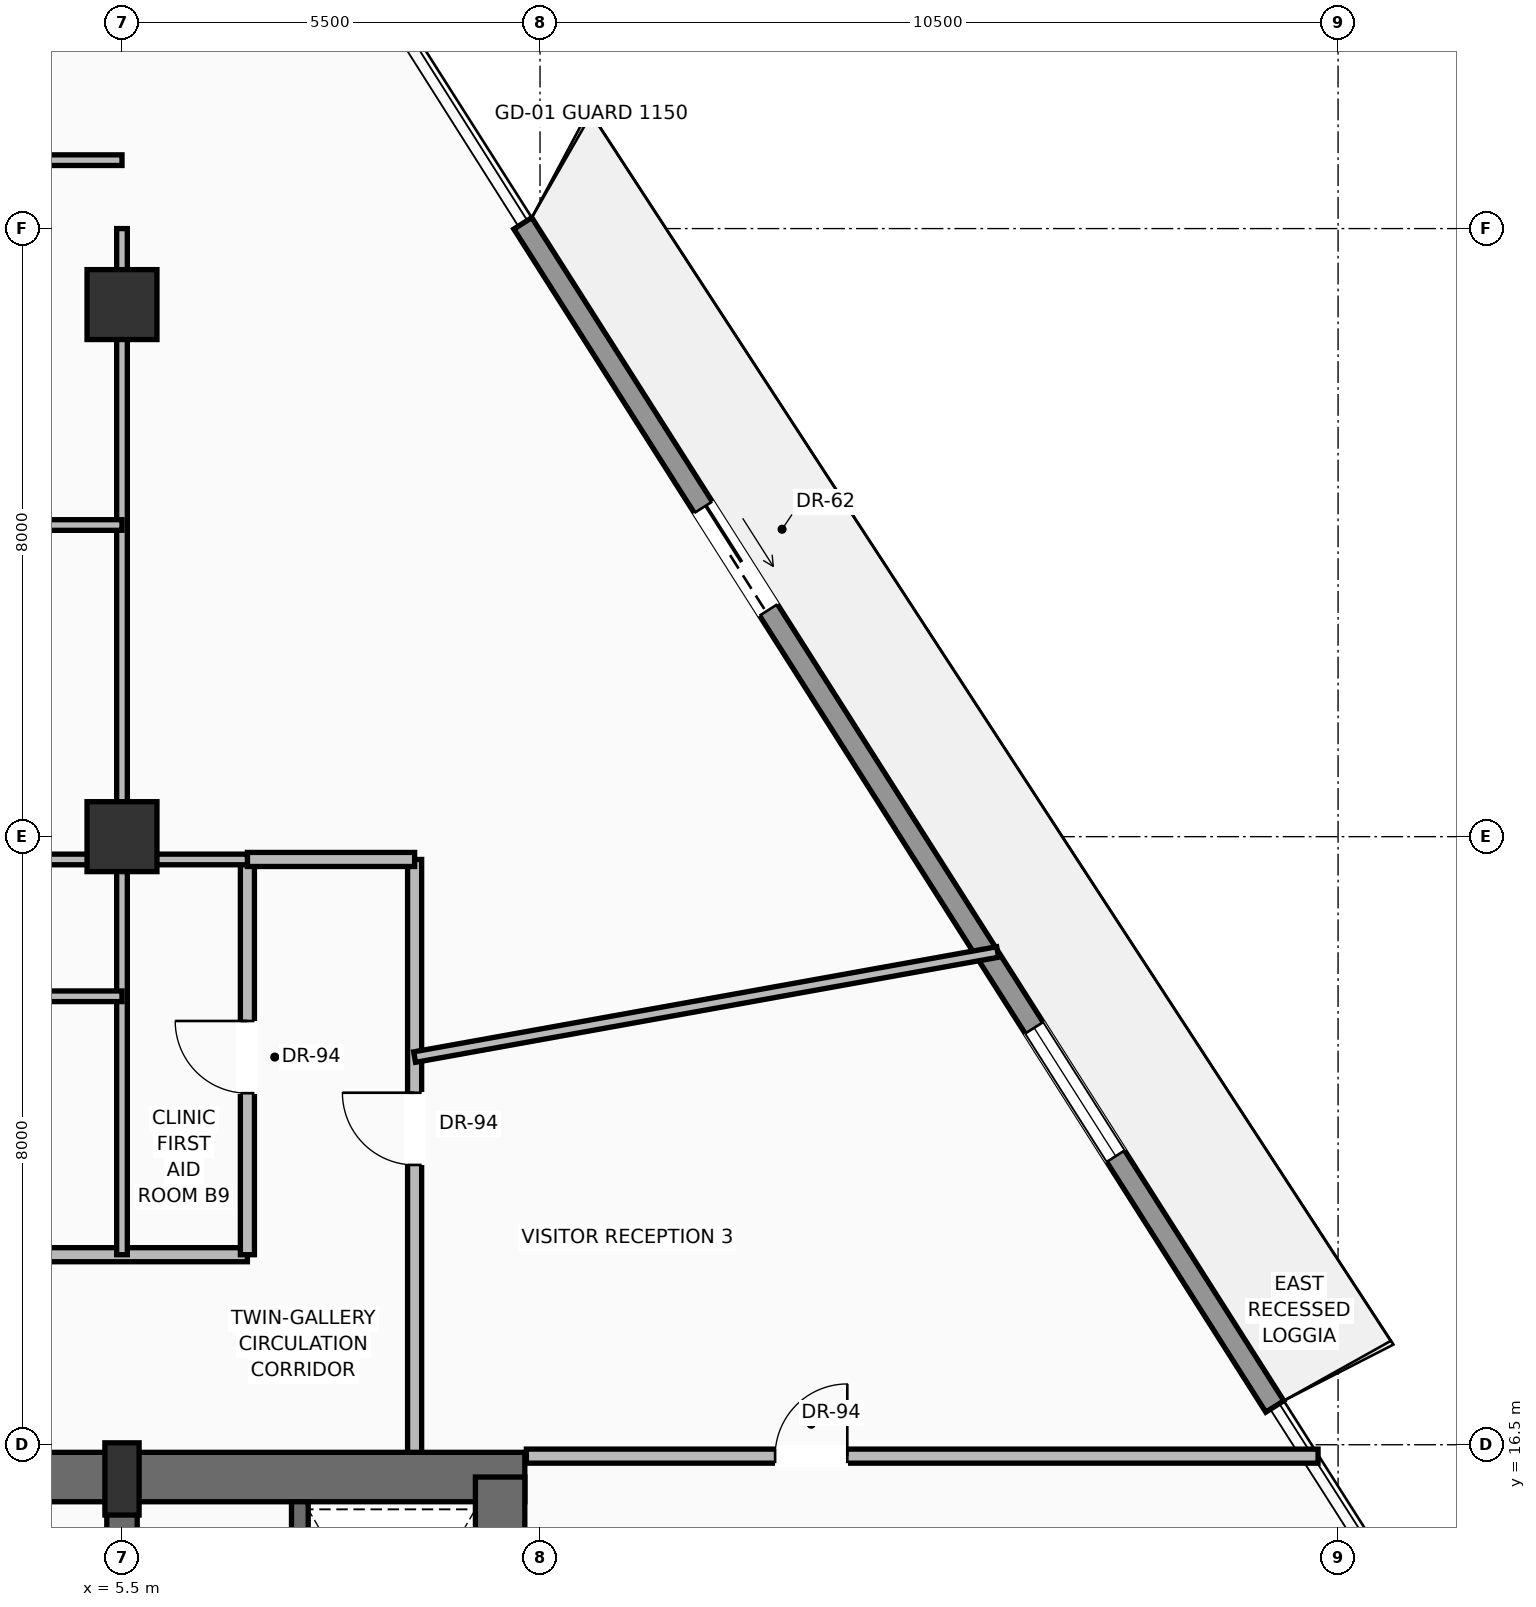
"""IFC4 building model, lengths in metres.
Left out: names, types, materials, properties, quantities, classifications, styles, units other than length and angle.
Written with IfcOpenShell. Run it as: python <this file> out.ifc"""

import sys

from ifc_helpers import new_model, si_unit, direction, frame, frame_2d, origin, origin_2d, place, context, subcontext, project, spatial, rectangle, extrude, source, transform, mapped, element, fill, save


model = new_model("IFC4")
c1 = context("Model", 3, precision=1e-05, world=origin(), true_north=direction((0.0, 1.0)))
c2 = subcontext(c1, "Body", "Model", "MODEL_VIEW")
j1 = project(units=[si_unit("LENGTHUNIT", "METRE"), si_unit("PLANEANGLEUNIT", "RADIAN")], contexts=[c1])
p1 = place(None, origin())
s1 = spatial("IfcSite", under=j1, at=p1, CompositionType="ELEMENT")
p2 = place(p1, origin())
s2 = spatial("IfcBuilding", under=s1, at=p2, CompositionType="ELEMENT")
p3 = place(p2, frame((0.0, 0.0, 158.9)))
s3 = spatial("IfcBuildingStorey", under=s2, at=p3, CompositionType="ELEMENT", Elevation=158.9)
p4 = place(p3, frame((-10.8, 16.075, 0.0), z_axis=(0.0, 0.0, 1.0), x_axis=(1.0, 0.0, 0.0)))
e1 = element("IfcWall", 1, at=p4, inside=s3, PredefinedType="SHEAR", context=c2, shape_type="SweptSolid", body=[
    extrude(rectangle(XDim=21.6, YDim=0.65, at=frame_2d((10.8, 0.0))), origin(), (0.0, 0.0, 1.0), 3.47),
])
p5 = place(p4, frame((3.37, 0.0, 0.0)))
e2 = element("IfcOpeningElement", 2, at=p5, cuts=e1, PredefinedType="OPENING", context=c2, shape_type="SweptSolid", body=[
    extrude(rectangle(XDim=1.3, YDim=2.3, at=frame_2d((0.65, 1.15))), frame((0.0, 0.335, 0.0), z_axis=(0.0, -1.0, 0.0), x_axis=(1.0, 0.0, 0.0)), (0.0, 0.0, 1.0), 0.67),
])
p6 = place(p4, frame((9.8, 0.0, 0.0)))
e3 = element("IfcOpeningElement", 3, at=p6, cuts=e1, PredefinedType="OPENING", context=c2, shape_type="SweptSolid", body=[
    extrude(rectangle(XDim=2.0, YDim=2.4, at=frame_2d((1.0, 1.2))), frame((0.0, 0.335, 0.0), z_axis=(0.0, -1.0, 0.0), x_axis=(1.0, 0.0, 0.0)), (0.0, 0.0, 1.0), 0.67),
])
p7 = place(p3, frame((10.475, 0.525, 0.0), z_axis=(0.0, 0.0, 1.0), x_axis=(0.0, 1.0, 0.0)))
e4 = element("IfcWall", 4, at=p7, inside=s3, PredefinedType="SHEAR", context=c2, shape_type="SweptSolid", body=[
    extrude(rectangle(XDim=15.55, YDim=0.65, at=frame_2d((7.775, 0.0))), origin(), (0.0, 0.0, 1.0), 3.47),
])
p8 = place(p3, frame((5.5, 0.525, 0.0), z_axis=(0.0, 0.0, 1.0), x_axis=(0.0, 1.0, 0.0)))
e5 = element("IfcWall", 5, at=p8, inside=s3, PredefinedType="SHEAR", context=c2, shape_type="SweptSolid", body=[
    extrude(rectangle(XDim=15.55, YDim=0.4, at=frame_2d((7.775, 0.0))), origin(), (0.0, 0.0, 1.0), 3.47),
])
p9 = place(p8, frame((8.975, 0.0, 0.0)))
e6 = element("IfcOpeningElement", 6, at=p9, cuts=e5, PredefinedType="OPENING", context=c2, shape_type="SweptSolid", body=[
    extrude(rectangle(XDim=1.1, YDim=2.2, at=frame_2d((0.55, 1.1))), frame((0.0, 0.21, 0.0), z_axis=(0.0, -1.0, 0.0), x_axis=(1.0, 0.0, 0.0)), (0.0, 0.0, 1.0), 0.42),
])
m1 = source(origin(), c2, "Body", "SweptSolid", [
    extrude(rectangle(XDim=0.45, YDim=0.95, at=origin_2d()), origin(), (0.0, 0.0, 1.0), 3.7),
])
p10 = place(p3, frame((5.5, 16.05, 0.0), z_axis=(0.0, 0.0, 1.0), x_axis=(1.0, 0.0, 0.0)))
e7 = element("IfcColumn", 7, at=p10, inside=s3, PredefinedType="PILASTER", context=c2, shape_type="MappedRepresentation", body=[
    mapped(m1, transform((0.0, 0.0, 0.0), scale=1.0)),
])
m2 = source(origin(), c2, "Body", "SweptSolid", [
    extrude(rectangle(XDim=0.92, YDim=0.92, at=origin_2d()), origin(), (0.0, 0.0, 1.0), 3.7),
])
for number, where, z_axis, x_axis in (
    (8, (5.5, 24.5, 0.0), (0.0, 0.0, 1.0), (1.0, 0.0, 0.0)),
    (9, (5.5, 31.5, 0.0), (0.0, 0.0, 1.0), (1.0, 0.0, 0.0)),
):
    element("IfcColumn", number, at=place(p3, frame(where, z_axis=z_axis, x_axis=x_axis)), inside=s3, PredefinedType="COLUMN", context=c2, shape_type="MappedRepresentation", body=[
        mapped(m2, transform((0.0, 0.0, 0.0), scale=1.0)),
    ])
p11 = place(p3, frame((10.773, 32.569, 0.0), z_axis=(0.0, 0.0, 1.0), x_axis=(0.536444584594, -0.8439355471, 0.0)))
e10 = element("IfcWall", 10, at=p11, inside=s3, PredefinedType="SOLIDWALL", context=c2, shape_type="SweptSolid", body=[
    extrude(rectangle(XDim=18.443, YDim=0.28, at=frame_2d((9.222, 0.0))), origin(), (0.0, 0.0, 1.0), 3.05),
])
p12 = place(p11, frame((4.427, 0.0, 0.0)))
e11 = element("IfcOpeningElement", 11, at=p12, cuts=e10, PredefinedType="OPENING", context=c2, shape_type="SweptSolid", body=[
    extrude(rectangle(XDim=1.6, YDim=2.35, at=frame_2d((0.8, 1.175))), frame((0.0, 0.15, 0.0), z_axis=(0.0, -1.0, 0.0), x_axis=(1.0, 0.0, 0.0)), (0.0, 0.0, 1.0), 0.3),
])
p13 = place(p11, frame((12.542, 0.0, 0.9)))
e12 = element("IfcOpeningElement", 12, at=p13, cuts=e10, PredefinedType="OPENING", context=c2, shape_type="SweptSolid", body=[
    extrude(rectangle(XDim=2.0, YDim=1.85, at=frame_2d((1.0, 0.925))), frame((0.0, 0.15, 0.0), z_axis=(0.0, -1.0, 0.0), x_axis=(1.0, 0.0, 0.0)), (0.0, 0.0, 1.0), 0.3),
])
p14 = place(p3, frame((7.84, 11.87, 0.0), z_axis=(0.0, 0.0, 1.0), x_axis=(0.0, 1.0, 0.0)))
e13 = element("IfcWall", 13, at=p14, inside=s3, PredefinedType="SOLIDWALL", context=c2, shape_type="SweptSolid", body=[
    extrude(rectangle(XDim=3.88, YDim=0.22, at=frame_2d((1.94, 0.0))), origin(), (0.0, 0.0, 1.0), 3.47),
])
p15 = place(p3, frame((-7.15, 19.0, 0.0), z_axis=(0.0, 0.0, 1.0), x_axis=(1.0, 0.0, 0.0)))
e14 = element("IfcWall", 14, at=p15, inside=s3, PredefinedType="PARTITIONING", context=c2, shape_type="SweptSolid", body=[
    extrude(rectangle(XDim=14.3, YDim=0.185, at=frame_2d((7.15, 0.0))), origin(), (0.0, 0.0, 1.0), 2.846),
])
p16 = place(p15, frame((6.675, 0.0, 0.0)))
e15 = element("IfcOpeningElement", 15, at=p16, cuts=e14, PredefinedType="OPENING", context=c2, shape_type="SweptSolid", body=[
    extrude(rectangle(XDim=0.95, YDim=2.2, at=frame_2d((0.475, 1.1))), frame((0.0, 0.103, 0.0), z_axis=(0.0, -1.0, 0.0), x_axis=(1.0, 0.0, 0.0)), (0.0, 0.0, 1.0), 0.205),
])
p17 = place(p3, frame((7.15, 19.0, 0.0), z_axis=(0.0, 0.0, 1.0), x_axis=(0.0, 1.0, 0.0)))
e16 = element("IfcWall", 16, at=p17, inside=s3, PredefinedType="PARTITIONING", context=c2, shape_type="SweptSolid", body=[
    extrude(rectangle(XDim=5.2, YDim=0.185, at=frame_2d((2.6, 0.0))), origin(), (0.0, 0.0, 1.0), 3.462),
])
p18 = place(p17, frame((2.125, 0.0, 0.0)))
e17 = element("IfcOpeningElement", 17, at=p18, cuts=e16, PredefinedType="OPENING", context=c2, shape_type="SweptSolid", body=[
    extrude(rectangle(XDim=0.95, YDim=2.2, at=frame_2d((0.475, 1.1))), frame((0.0, 0.103, 0.0), z_axis=(0.0, -1.0, 0.0), x_axis=(1.0, 0.0, 0.0)), (0.0, 0.0, 1.0), 0.205),
])
p19 = place(p3, frame((9.35, 16.4, 0.0), z_axis=(0.0, 0.0, 1.0), x_axis=(0.0, 1.0, 0.0)))
e18 = element("IfcWall", 18, at=p19, inside=s3, PredefinedType="PARTITIONING", context=c2, shape_type="SweptSolid", body=[
    extrude(rectangle(XDim=7.8, YDim=0.185, at=frame_2d((3.9, 0.0))), origin(), (0.0, 0.0, 1.0), 3.462),
])
p20 = place(p19, frame((3.781, 0.0, 0.0)))
e19 = element("IfcOpeningElement", 19, at=p20, cuts=e18, PredefinedType="OPENING", context=c2, shape_type="SweptSolid", body=[
    extrude(rectangle(XDim=0.95, YDim=2.2, at=frame_2d((0.475, 1.1))), frame((0.0, 0.103, 0.0), z_axis=(0.0, -1.0, 0.0), x_axis=(1.0, 0.0, 0.0)), (0.0, 0.0, 1.0), 0.205),
])
p21 = place(p3, frame((7.15, 24.2, 0.0), z_axis=(0.0, 0.0, 1.0), x_axis=(1.0, 0.0, 0.0)))
e20 = element("IfcWall", 20, at=p21, inside=s3, PredefinedType="PARTITIONING", context=c2, shape_type="SweptSolid", body=[
    extrude(rectangle(XDim=2.2, YDim=0.185, at=frame_2d((1.1, 0.0))), origin(), (0.0, 0.0, 1.0), 3.462),
])
p22 = place(p3, frame((10.82, 16.35, 0.0), z_axis=(0.0, 0.0, 1.0), x_axis=(1.0, 0.0, 0.0)))
e21 = element("IfcWall", 21, at=p22, inside=s3, PredefinedType="PARTITIONING", context=c2, shape_type="SweptSolid", body=[
    extrude(rectangle(XDim=10.417, YDim=0.185, at=frame_2d((5.208, 0.0))), origin(), (0.0, 0.0, 1.0), 3.462),
])
p23 = place(p22, frame((3.273, 0.0, 0.0)))
e22 = element("IfcOpeningElement", 22, at=p23, cuts=e21, PredefinedType="OPENING", context=c2, shape_type="SweptSolid", body=[
    extrude(rectangle(XDim=0.95, YDim=2.2, at=frame_2d((0.475, 1.1))), frame((0.0, 0.103, 0.0), z_axis=(0.0, -1.0, 0.0), x_axis=(1.0, 0.0, 0.0)), (0.0, 0.0, 1.0), 0.205),
])
p24 = place(p3, frame((-7.15, 24.2, 0.0), z_axis=(0.0, 0.0, 1.0), x_axis=(1.0, 0.0, 0.0)))
e23 = element("IfcWall", 23, at=p24, inside=s3, PredefinedType="PARTITIONING", context=c2, shape_type="SweptSolid", body=[
    extrude(rectangle(XDim=14.3, YDim=0.14, at=frame_2d((7.15, 0.0))), origin(), (0.0, 0.0, 1.0), 3.462),
])
p25 = place(p3, frame((5.5, 19.0, 0.0), z_axis=(0.0, 0.0, 1.0), x_axis=(0.0, 1.0, 0.0)))
e24 = element("IfcWall", 24, at=p25, inside=s3, PredefinedType="PARTITIONING", context=c2, shape_type="SweptSolid", body=[
    extrude(rectangle(XDim=13.5, YDim=0.14, at=frame_2d((6.75, 0.0))), origin(), (0.0, 0.0, 1.0), 2.846),
])
p26 = place(p3, frame((-5.5, 22.4, 0.0), z_axis=(0.0, 0.0, 1.0), x_axis=(1.0, 0.0, 0.0)))
e25 = element("IfcWall", 25, at=p26, inside=s3, PredefinedType="PARTITIONING", context=c2, shape_type="SweptSolid", body=[
    extrude(rectangle(XDim=11.0, YDim=0.14, at=frame_2d((5.5, 0.0))), origin(), (0.0, 0.0, 1.0), 3.462),
])
p27 = place(p26, frame((5.025, 0.0, 0.0)))
e26 = element("IfcOpeningElement", 26, at=p27, cuts=e25, PredefinedType="OPENING", context=c2, shape_type="SweptSolid", body=[
    extrude(rectangle(XDim=0.95, YDim=2.2, at=frame_2d((0.475, 1.1))), frame((0.0, 0.08, 0.0), z_axis=(0.0, -1.0, 0.0), x_axis=(1.0, 0.0, 0.0)), (0.0, 0.0, 1.0), 0.16),
])
for number, where, z_axis, x_axis in (
    (27, (-5.5, 28.6, 0.0), (0.0, 0.0, 1.0), (1.0, 0.0, 0.0)),
    (28, (-5.5, 33.4, 0.0), (0.0, 0.0, 1.0), (1.0, 0.0, 0.0)),
):
    element("IfcWall", number, at=place(p3, frame(where, z_axis=z_axis, x_axis=x_axis)), inside=s3, PredefinedType="PARTITIONING", context=c2, shape_type="SweptSolid", body=[
        extrude(rectangle(XDim=11.0, YDim=0.14, at=frame_2d((5.5, 0.0))), origin(), (0.0, 0.0, 1.0), 3.462),
    ])
p28 = place(p3, frame((9.35, 21.6, 0.0), z_axis=(0.0, 0.0, 1.0), x_axis=(0.984141901037, 0.177382971628, 0.0)))
e29 = element("IfcWall", 29, at=p28, inside=s3, PredefinedType="PARTITIONING", context=c2, shape_type="SweptSolid", body=[
    extrude(rectangle(XDim=7.794, YDim=0.14, at=frame_2d((3.897, 0.0))), origin(), (0.0, 0.0, 1.0), 3.049),
])
m3 = source(origin(), c2, "Body", "SweptSolid", [
    extrude(rectangle(XDim=1.6, YDim=2.35, at=frame_2d((0.8, 1.175))), frame((0.0, 0.025, 0.0), z_axis=(0.0, -1.0, 0.0), x_axis=(1.0, 0.0, 0.0)), (0.0, 0.0, 1.0), 0.05),
])
p29 = place(p12, origin())
e30 = element("IfcDoor", 30, at=p29, inside=s3, OperationType="SLIDING_TO_RIGHT", PredefinedType="DOOR", context=c2, shape_type="MappedRepresentation", body=[
    mapped(m3, transform((0.0, 0.0, 0.0), scale=1.0)),
])
fill(e11, e30)
m4 = source(origin(), c2, "Body", "SweptSolid", [
    extrude(rectangle(XDim=2.0, YDim=1.85, at=frame_2d((1.0, 0.925))), frame((0.0, 0.03, 0.0), z_axis=(0.0, -1.0, 0.0), x_axis=(1.0, 0.0, 0.0)), (0.0, 0.0, 1.0), 0.06),
])
p30 = place(p13, origin())
e31 = element("IfcWindow", 31, at=p30, inside=s3, PartitioningType="SINGLE_PANEL", PredefinedType="WINDOW", context=c2, shape_type="MappedRepresentation", body=[
    mapped(m4, transform((0.0, 0.0, 0.0), scale=1.0)),
])
fill(e12, e31)
m5 = source(origin(), c2, "Body", "SweptSolid", [
    extrude(rectangle(XDim=0.95, YDim=2.2, at=frame_2d((0.475, 1.1))), frame((0.0, 0.025, 0.0), z_axis=(0.0, -1.0, 0.0), x_axis=(1.0, 0.0, 0.0)), (0.0, 0.0, 1.0), 0.05),
])
p31 = place(p20, origin())
e32 = element("IfcDoor", 32, at=p31, inside=s3, OperationType="SINGLE_SWING_RIGHT", PredefinedType="DOOR", context=c2, shape_type="MappedRepresentation", body=[
    mapped(m5, transform((0.0, 0.0, 0.0), scale=1.0)),
])
fill(e19, e32)
p32 = place(p23, origin())
e33 = element("IfcDoor", 33, at=p32, inside=s3, OperationType="SINGLE_SWING_RIGHT", PredefinedType="DOOR", context=c2, shape_type="MappedRepresentation", body=[
    mapped(m5, transform((0.0, 0.0, 0.0), scale=1.0)),
])
fill(e22, e33)
p33 = place(p18, origin())
e34 = element("IfcDoor", 34, at=p33, inside=s3, OperationType="SINGLE_SWING_RIGHT", PredefinedType="DOOR", context=c2, shape_type="MappedRepresentation", body=[
    mapped(m5, transform((0.0, 0.0, 0.0), scale=1.0)),
])
fill(e17, e34)
save(model, sys.argv[1])
